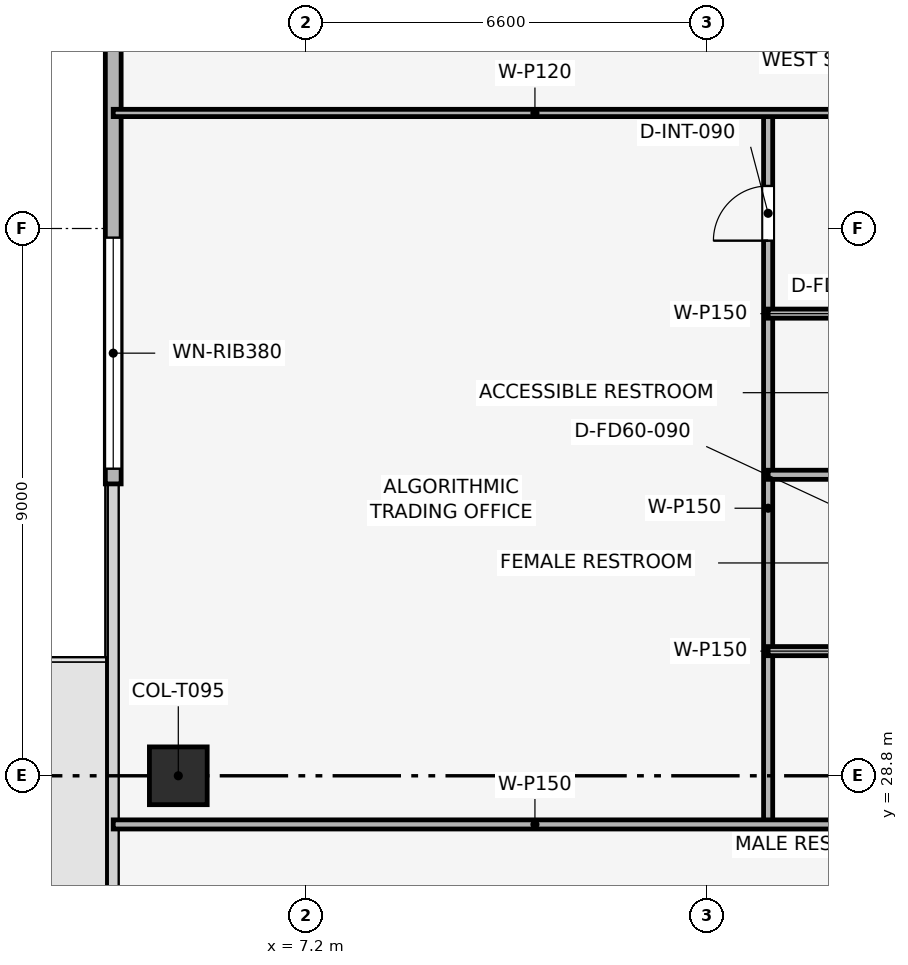
"""IFC4 building model, lengths in metres.
Left out: names, types, materials, properties, quantities, classifications, styles, units other than length and angle.
Written with IfcOpenShell. Run it as: python <this file> out.ifc"""

import sys

from ifc_helpers import new_model, si_unit, direction, frame, frame_2d, origin, origin_2d, place, context, subcontext, project, spatial, rectangle, extrude, element, fill, save


model = new_model("IFC4")
c1 = context("Model", 3, precision=1e-05, world=origin(), true_north=direction((0.0, 1.0)))
c2 = subcontext(c1, "Body", "Model", "MODEL_VIEW")
j1 = project(units=[si_unit("LENGTHUNIT", "METRE"), si_unit("PLANEANGLEUNIT", "RADIAN")], contexts=[c1])
p1 = place(None, origin())
s1 = spatial("IfcSite", under=j1, at=p1, CompositionType="ELEMENT")
p2 = place(p1, origin())
s2 = spatial("IfcBuilding", under=s1, at=p2, CompositionType="ELEMENT")
p3 = place(p2, frame((0.0, 0.0, 261.6)))
s3 = spatial("IfcBuildingStorey", under=s2, at=p3, CompositionType="ELEMENT", Elevation=261.6)
p4 = place(p3, frame((5.1, 28.8, 0.003), z_axis=(0.0, 0.0, 1.0), x_axis=(1.0, 0.0, 0.0)))
e1 = element("IfcColumn", 1, at=p4, inside=s3, PredefinedType="COLUMN", context=c2, shape_type="SweptSolid", body=[
    extrude(rectangle(XDim=0.95, YDim=0.95, at=origin_2d()), origin(), (0.0, 0.0, 1.0), 3.494),
])
p5 = place(p3, frame((4.03, 33.6, 0.0), z_axis=(0.0, 0.0, 1.0), x_axis=(0.0, 1.0, 0.0)))
e2 = element("IfcWall", 2, at=p5, inside=s3, PredefinedType="SOLIDWALL", context=c2, shape_type="SweptSolid", body=[
    extrude(rectangle(XDim=13.2, YDim=0.26, at=frame_2d((6.6, 0.0))), origin(), (0.0, 0.0, 1.0), 3.5),
])
p6 = place(p5, frame((0.25, 0.0, 0.9)))
e3 = element("IfcOpeningElement", 3, at=p6, cuts=e2, PredefinedType="OPENING", context=c2, shape_type="SweptSolid", body=[
    extrude(rectangle(XDim=3.8, YDim=1.9, at=frame_2d((1.9, 0.95))), frame((0.0, 0.14, 0.0), z_axis=(0.0, -1.0, 0.0), x_axis=(1.0, 0.0, 0.0)), (0.0, 0.0, 1.0), 0.28),
])
p7 = place(p3, frame((14.8, 28.0, 0.0), z_axis=(0.0, 0.0, 1.0), x_axis=(0.0, 1.0, 0.0)))
e4 = element("IfcWall", 4, at=p7, inside=s3, PredefinedType="PARTITIONING", context=c2, shape_type="SweptSolid", body=[
    extrude(rectangle(XDim=11.7, YDim=0.15, at=frame_2d((5.85, 0.0))), origin(), (0.0, 0.0, 1.0), 3.085),
])
p8 = place(p7, frame((9.6, 0.0, 0.0)))
e5 = element("IfcOpeningElement", 5, at=p8, cuts=e4, PredefinedType="OPENING", context=c2, shape_type="SweptSolid", body=[
    extrude(rectangle(XDim=0.9, YDim=2.1, at=frame_2d((0.45, 1.05))), frame((0.0, 0.085, 0.0), z_axis=(0.0, -1.0, 0.0), x_axis=(1.0, 0.0, 0.0)), (0.0, 0.0, 1.0), 0.17),
])
p9 = place(p3, frame((4.03, 28.0, 0.0), z_axis=(0.0, 0.0, 1.0), x_axis=(1.0, 0.0, 0.0)))
e6 = element("IfcWall", 6, at=p9, inside=s3, PredefinedType="PARTITIONING", context=c2, shape_type="SweptSolid", body=[
    extrude(rectangle(XDim=13.87, YDim=0.15, at=frame_2d((6.935, 0.0))), origin(), (0.0, 0.0, 1.0), 3.085),
])
for number, where, z_axis, x_axis in (
    (7, (14.8, 36.4, 0.0), (0.0, 0.0, 1.0), (1.0, 0.0, 0.0)),
    (8, (14.8, 30.85, 0.0), (0.0, 0.0, 1.0), (1.0, 0.0, 0.0)),
    (9, (14.8, 33.75, 0.0), (0.0, 0.0, 1.0), (1.0, 0.0, 0.0)),
):
    element("IfcWall", number, at=place(p3, frame(where, z_axis=z_axis, x_axis=x_axis)), inside=s3, PredefinedType="PARTITIONING", context=c2, shape_type="SweptSolid", body=[
        extrude(rectangle(XDim=3.1, YDim=0.15, at=frame_2d((1.55, 0.0))), origin(), (0.0, 0.0, 1.0), 3.5),
    ])
p10 = place(p3, frame((4.03, 39.7, 0.0), z_axis=(0.0, 0.0, 1.0), x_axis=(1.0, 0.0, 0.0)))
e10 = element("IfcWall", 10, at=p10, inside=s3, PredefinedType="PARTITIONING", context=c2, shape_type="SweptSolid", body=[
    extrude(rectangle(XDim=13.87, YDim=0.12, at=frame_2d((6.935, 0.0))), origin(), (0.0, 0.0, 1.0), 3.085),
])
p11 = place(p6, origin())
e11 = element("IfcWindow", 11, at=p11, inside=s3, PartitioningType="SINGLE_PANEL", PredefinedType="WINDOW", context=c2, shape_type="SweptSolid", body=[
    extrude(rectangle(XDim=3.8, YDim=1.9, at=frame_2d((1.9, 0.95))), frame((0.0, 0.03, 0.0), z_axis=(0.0, -1.0, 0.0), x_axis=(1.0, 0.0, 0.0)), (0.0, 0.0, 1.0), 0.06),
])
fill(e3, e11)
p12 = place(p8, origin())
e12 = element("IfcDoor", 12, at=p12, inside=s3, OperationType="SINGLE_SWING_LEFT", PredefinedType="DOOR", context=c2, shape_type="SweptSolid", body=[
    extrude(rectangle(XDim=0.9, YDim=2.1, at=frame_2d((0.45, 1.05))), frame((0.0, 0.025, 0.0), z_axis=(0.0, -1.0, 0.0), x_axis=(1.0, 0.0, 0.0)), (0.0, 0.0, 1.0), 0.05),
])
fill(e5, e12)
save(model, sys.argv[1])
